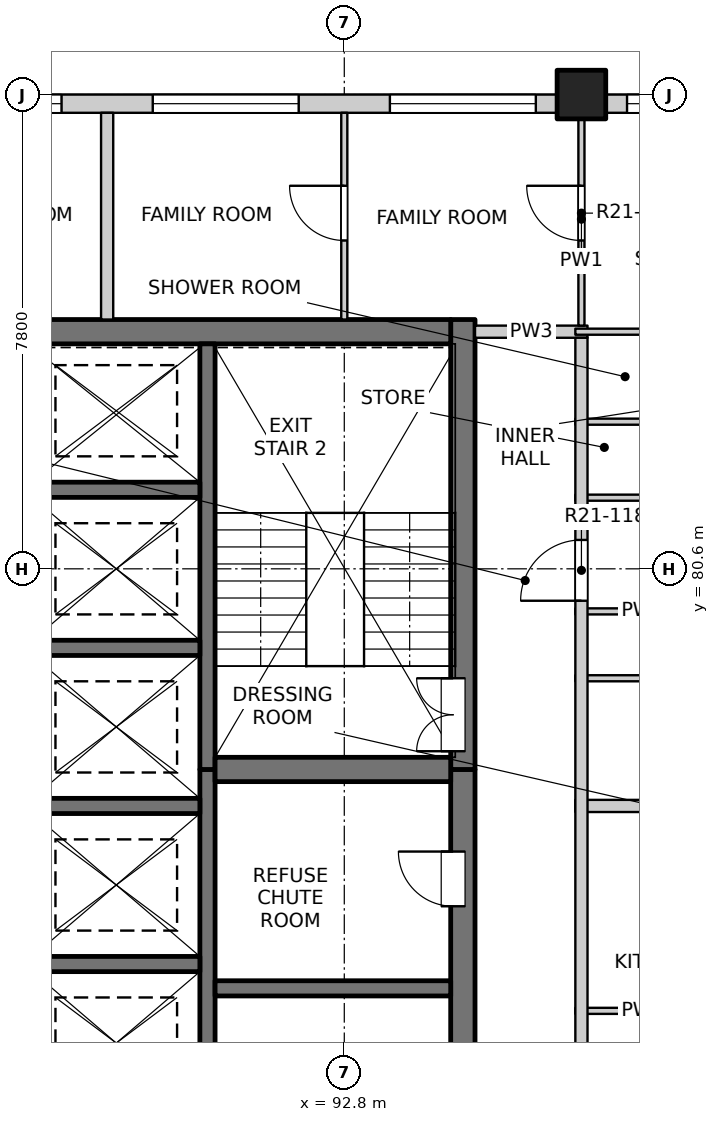
"""IFC4 building model, lengths in metres.
Left out: names, types, materials, properties, quantities, classifications, styles, units other than length and angle.
Written with IfcOpenShell. Run it as: python <this file> out.ifc"""

import sys

from ifc_helpers import new_model, si_unit, direction, frame, frame_2d, origin, origin_2d, place, context, subcontext, project, spatial, rectangle, extrude, element, fill, save


model = new_model("IFC4")
c1 = context("Model", 3, precision=1e-05, world=origin(), true_north=direction((0.0, 1.0)))
c2 = subcontext(c1, "Body", "Model", "MODEL_VIEW")
j1 = project(units=[si_unit("LENGTHUNIT", "METRE"), si_unit("PLANEANGLEUNIT", "RADIAN")], contexts=[c1])
p1 = place(None, origin())
s1 = spatial("IfcSite", under=j1, at=p1, CompositionType="ELEMENT")
p2 = place(p1, origin())
s2 = spatial("IfcBuilding", under=s1, at=p2, CompositionType="ELEMENT")
p3 = place(p2, frame((0.0, 0.0, 221.1)))
s3 = spatial("IfcBuildingStorey", under=s2, at=p3, CompositionType="ELEMENT", Elevation=221.1)
p4 = place(p3, frame((96.7, 88.4, -0.25), z_axis=(0.0, 0.0, 1.0), x_axis=(1.0, 0.0, 0.0)))
e1 = element("IfcColumn", 1, at=p4, inside=s3, PredefinedType="COLUMN", context=c2, shape_type="SweptSolid", body=[
    extrude(rectangle(XDim=0.8, YDim=0.8, at=origin_2d()), origin(), (0.0, 0.0, 1.0), 3.4),
])
p5 = place(p3, frame((94.75, 61.95, -0.25), z_axis=(0.0, 0.0, 1.0), x_axis=(0.0, 1.0, 0.0)))
e2 = element("IfcWall", 2, at=p5, inside=s3, PredefinedType="SOLIDWALL", context=c2, shape_type="SweptSolid", body=[
    extrude(rectangle(XDim=15.35, YDim=0.4, at=frame_2d((7.675, 0.0))), origin(), (0.0, 0.0, 1.0), 3.4),
])
p6 = place(p5, frame((0.925, 0.0, 0.25)))
e3 = element("IfcOpeningElement", 3, at=p6, cuts=e2, PredefinedType="OPENING", context=c2, shape_type="SweptSolid", body=[
    extrude(rectangle(XDim=0.9, YDim=2.1, at=frame_2d((0.45, 1.05))), frame((0.0, 0.21, 0.0), z_axis=(0.0, -1.0, 0.0), x_axis=(1.0, 0.0, 0.0)), (0.0, 0.0, 1.0), 0.42),
])
p7 = place(p5, frame((3.8, 0.0, 0.25)))
e4 = element("IfcOpeningElement", 4, at=p7, cuts=e2, PredefinedType="OPENING", context=c2, shape_type="SweptSolid", body=[
    extrude(rectangle(XDim=0.9, YDim=2.1, at=frame_2d((0.45, 1.05))), frame((0.0, 0.21, 0.0), z_axis=(0.0, -1.0, 0.0), x_axis=(1.0, 0.0, 0.0)), (0.0, 0.0, 1.0), 0.42),
])
p8 = place(p5, frame((8.3, 0.0, 0.25)))
e5 = element("IfcOpeningElement", 5, at=p8, cuts=e2, PredefinedType="OPENING", context=c2, shape_type="SweptSolid", body=[
    extrude(rectangle(XDim=0.9, YDim=2.1, at=frame_2d((0.45, 1.05))), frame((0.0, 0.21, 0.0), z_axis=(0.0, -1.0, 0.0), x_axis=(1.0, 0.0, 0.0)), (0.0, 0.0, 1.0), 0.42),
])
p9 = place(p5, frame((13.1, 0.0, 0.25)))
e6 = element("IfcOpeningElement", 6, at=p9, cuts=e2, PredefinedType="OPENING", context=c2, shape_type="SweptSolid", body=[
    extrude(rectangle(XDim=0.9, YDim=2.1, at=frame_2d((0.45, 1.05))), frame((0.0, 0.21, 0.0), z_axis=(0.0, -1.0, 0.0), x_axis=(1.0, 0.0, 0.0)), (0.0, 0.0, 1.0), 0.42),
])
p10 = place(p3, frame((94.75, 77.3, -0.25), z_axis=(0.0, 0.0, 1.0), x_axis=(0.0, 1.0, 0.0)))
e7 = element("IfcWall", 7, at=p10, inside=s3, PredefinedType="SOLIDWALL", context=c2, shape_type="SweptSolid", body=[
    extrude(rectangle(XDim=7.4, YDim=0.4, at=frame_2d((3.7, 0.0))), origin(), (0.0, 0.0, 1.0), 3.4),
])
p11 = place(p10, frame((0.3, 0.0, 0.25)))
e8 = element("IfcOpeningElement", 8, at=p11, cuts=e7, PredefinedType="OPENING", context=c2, shape_type="SweptSolid", body=[
    extrude(rectangle(XDim=1.2, YDim=2.1, at=frame_2d((0.6, 1.05))), frame((0.0, 0.21, 0.0), z_axis=(0.0, -1.0, 0.0), x_axis=(1.0, 0.0, 0.0)), (0.0, 0.0, 1.0), 0.42),
])
p12 = place(p3, frame((75.45, 84.5, -0.25), z_axis=(0.0, 0.0, 1.0), x_axis=(1.0, 0.0, 0.0)))
e9 = element("IfcWall", 9, at=p12, inside=s3, PredefinedType="SOLIDWALL", context=c2, shape_type="SweptSolid", body=[
    extrude(rectangle(XDim=19.1, YDim=0.4, at=frame_2d((9.55, 0.0))), origin(), (0.0, 0.0, 1.0), 3.4),
])
p13 = place(p3, frame((90.55, 61.95, -0.25), z_axis=(0.0, 0.0, 1.0), x_axis=(0.0, 1.0, 0.0)))
e10 = element("IfcWall", 10, at=p13, inside=s3, PredefinedType="SOLIDWALL", context=c2, shape_type="SweptSolid", body=[
    extrude(rectangle(XDim=15.35, YDim=0.25, at=frame_2d((7.675, 0.0))), origin(), (0.0, 0.0, 1.0), 3.4),
])
p14 = place(p3, frame((90.55, 77.3, -0.25), z_axis=(0.0, 0.0, 1.0), x_axis=(0.0, 1.0, 0.0)))
e11 = element("IfcWall", 11, at=p14, inside=s3, PredefinedType="SOLIDWALL", context=c2, shape_type="SweptSolid", body=[
    extrude(rectangle(XDim=7.0, YDim=0.25, at=frame_2d((3.5, 0.0))), origin(), (0.0, 0.0, 1.0), 3.4),
])
for number, where, z_axis, x_axis in (
    (12, (87.425, 74.1, -0.25), (0.0, 0.0, 1.0), (1.0, 0.0, 0.0)),
    (13, (87.425, 76.7, -0.25), (0.0, 0.0, 1.0), (1.0, 0.0, 0.0)),
    (14, (87.425, 79.3, -0.25), (0.0, 0.0, 1.0), (1.0, 0.0, 0.0)),
    (15, (87.425, 81.9, -0.25), (0.0, 0.0, 1.0), (1.0, 0.0, 0.0)),
):
    element("IfcWall", number, at=place(p3, frame(where, z_axis=z_axis, x_axis=x_axis)), inside=s3, PredefinedType="SOLIDWALL", context=c2, shape_type="SweptSolid", body=[
        extrude(rectangle(XDim=3.0, YDim=0.25, at=frame_2d((1.5, 0.0))), origin(), (0.0, 0.0, 1.0), 3.4),
    ])
p15 = place(p3, frame((90.675, 73.7, -0.25), z_axis=(0.0, 0.0, 1.0), x_axis=(1.0, 0.0, 0.0)))
e16 = element("IfcWall", 16, at=p15, inside=s3, PredefinedType="SOLIDWALL", context=c2, shape_type="SweptSolid", body=[
    extrude(rectangle(XDim=3.875, YDim=0.25, at=frame_2d((1.938, 0.0))), origin(), (0.0, 0.0, 1.0), 3.4),
])
p16 = place(p3, frame((90.675, 77.3, -0.25), z_axis=(0.0, 0.0, 1.0), x_axis=(1.0, 0.0, 0.0)))
e17 = element("IfcWall", 17, at=p16, inside=s3, PredefinedType="SOLIDWALL", context=c2, shape_type="SweptSolid", body=[
    extrude(rectangle(XDim=3.875, YDim=0.4, at=frame_2d((1.938, 0.0))), origin(), (0.0, 0.0, 1.0), 3.4),
])
p17 = place(p3, frame((73.7, 88.25, 0.0), z_axis=(0.0, 0.0, 1.0), x_axis=(1.0, 0.0, 0.0)))
e18 = element("IfcWall", 18, at=p17, inside=s3, PredefinedType="SOLIDWALL", context=c2, shape_type="SweptSolid", body=[
    extrude(rectangle(XDim=22.6, YDim=0.3, at=frame_2d((11.3, 0.0))), origin(), (0.0, 0.0, 1.0), 2.7),
])
p18 = place(p17, frame((0.35, 0.0, 0.9)))
e19 = element("IfcOpeningElement", 19, at=p18, cuts=e18, PredefinedType="OPENING", context=c2, shape_type="SweptSolid", body=[
    extrude(rectangle(XDim=2.4, YDim=1.8, at=frame_2d((1.2, 0.9))), frame((0.0, 0.16, 0.0), z_axis=(0.0, -1.0, 0.0), x_axis=(1.0, 0.0, 0.0)), (0.0, 0.0, 1.0), 0.32),
])
p19 = place(p17, frame((4.25, 0.0, 0.9)))
e20 = element("IfcOpeningElement", 20, at=p19, cuts=e18, PredefinedType="OPENING", context=c2, shape_type="SweptSolid", body=[
    extrude(rectangle(XDim=2.4, YDim=1.8, at=frame_2d((1.2, 0.9))), frame((0.0, 0.16, 0.0), z_axis=(0.0, -1.0, 0.0), x_axis=(1.0, 0.0, 0.0)), (0.0, 0.0, 1.0), 0.32),
])
p20 = place(p17, frame((8.15, 0.0, 0.9)))
e21 = element("IfcOpeningElement", 21, at=p20, cuts=e18, PredefinedType="OPENING", context=c2, shape_type="SweptSolid", body=[
    extrude(rectangle(XDim=2.4, YDim=1.8, at=frame_2d((1.2, 0.9))), frame((0.0, 0.16, 0.0), z_axis=(0.0, -1.0, 0.0), x_axis=(1.0, 0.0, 0.0)), (0.0, 0.0, 1.0), 0.32),
])
p21 = place(p17, frame((12.05, 0.0, 0.9)))
e22 = element("IfcOpeningElement", 22, at=p21, cuts=e18, PredefinedType="OPENING", context=c2, shape_type="SweptSolid", body=[
    extrude(rectangle(XDim=2.4, YDim=1.8, at=frame_2d((1.2, 0.9))), frame((0.0, 0.16, 0.0), z_axis=(0.0, -1.0, 0.0), x_axis=(1.0, 0.0, 0.0)), (0.0, 0.0, 1.0), 0.32),
])
p22 = place(p17, frame((15.95, 0.0, 0.9)))
e23 = element("IfcOpeningElement", 23, at=p22, cuts=e18, PredefinedType="OPENING", context=c2, shape_type="SweptSolid", body=[
    extrude(rectangle(XDim=2.4, YDim=1.8, at=frame_2d((1.2, 0.9))), frame((0.0, 0.16, 0.0), z_axis=(0.0, -1.0, 0.0), x_axis=(1.0, 0.0, 0.0)), (0.0, 0.0, 1.0), 0.32),
])
p23 = place(p17, frame((19.85, 0.0, 0.9)))
e24 = element("IfcOpeningElement", 24, at=p23, cuts=e18, PredefinedType="OPENING", context=c2, shape_type="SweptSolid", body=[
    extrude(rectangle(XDim=2.4, YDim=1.8, at=frame_2d((1.2, 0.9))), frame((0.0, 0.16, 0.0), z_axis=(0.0, -1.0, 0.0), x_axis=(1.0, 0.0, 0.0)), (0.0, 0.0, 1.0), 0.32),
])
p24 = place(p3, frame((97.1, 88.25, 0.0), z_axis=(0.0, 0.0, 1.0), x_axis=(1.0, 0.0, 0.0)))
e25 = element("IfcWall", 25, at=p24, inside=s3, PredefinedType="SOLIDWALL", context=c2, shape_type="SweptSolid", body=[
    extrude(rectangle(XDim=7.4, YDim=0.3, at=frame_2d((3.7, 0.0))), origin(), (0.0, 0.0, 1.0), 2.7),
])
p25 = place(p24, frame((0.35, 0.0, 0.9)))
e26 = element("IfcOpeningElement", 26, at=p25, cuts=e25, PredefinedType="OPENING", context=c2, shape_type="SweptSolid", body=[
    extrude(rectangle(XDim=2.4, YDim=1.8, at=frame_2d((1.2, 0.9))), frame((0.0, 0.16, 0.0), z_axis=(0.0, -1.0, 0.0), x_axis=(1.0, 0.0, 0.0)), (0.0, 0.0, 1.0), 0.32),
])
p26 = place(p24, frame((4.25, 0.0, 0.9)))
e27 = element("IfcOpeningElement", 27, at=p26, cuts=e25, PredefinedType="OPENING", context=c2, shape_type="SweptSolid", body=[
    extrude(rectangle(XDim=2.4, YDim=1.8, at=frame_2d((1.2, 0.9))), frame((0.0, 0.16, 0.0), z_axis=(0.0, -1.0, 0.0), x_axis=(1.0, 0.0, 0.0)), (0.0, 0.0, 1.0), 0.32),
])
p27 = place(p3, frame((96.6, 73.33, 0.0), z_axis=(0.0, 0.0, 1.0), x_axis=(1.0, 0.0, 0.0)))
e28 = element("IfcWall", 28, at=p27, inside=s3, PredefinedType="PARTITIONING", context=c2, shape_type="SweptSolid", body=[
    extrude(rectangle(XDim=2.22, YDim=0.1, at=frame_2d((1.11, 0.0))), origin(), (0.0, 0.0, 1.0), 3.15),
])
p28 = place(p3, frame((96.6, 76.7, 0.0), z_axis=(0.0, 0.0, 1.0), x_axis=(1.0, 0.0, 0.0)))
e29 = element("IfcWall", 29, at=p28, inside=s3, PredefinedType="PARTITIONING", context=c2, shape_type="SweptSolid", body=[
    extrude(rectangle(XDim=11.5, YDim=0.2, at=frame_2d((5.75, 0.0))), origin(), (0.0, 0.0, 1.0), 2.55),
])
for number, where, z_axis, x_axis in (
    (30, (96.6, 78.8, 0.0), (0.0, 0.0, 1.0), (1.0, 0.0, 0.0)),
    (31, (96.6, 79.9, 0.0), (0.0, 0.0, 1.0), (1.0, 0.0, 0.0)),
    (32, (96.6, 81.77, 0.0), (0.0, 0.0, 1.0), (1.0, 0.0, 0.0)),
    (33, (96.6, 83.02, 0.0), (0.0, 0.0, 1.0), (1.0, 0.0, 0.0)),
):
    element("IfcWall", number, at=place(p3, frame(where, z_axis=z_axis, x_axis=x_axis)), inside=s3, PredefinedType="PARTITIONING", context=c2, shape_type="SweptSolid", body=[
        extrude(rectangle(XDim=2.22, YDim=0.1, at=frame_2d((1.11, 0.0))), origin(), (0.0, 0.0, 1.0), 3.15),
    ])
p29 = place(p3, frame((94.95, 84.5, 0.0), z_axis=(0.0, 0.0, 1.0), x_axis=(1.0, 0.0, 0.0)))
e34 = element("IfcWall", 34, at=p29, inside=s3, PredefinedType="PARTITIONING", context=c2, shape_type="SweptSolid", body=[
    extrude(rectangle(XDim=1.85, YDim=0.2, at=frame_2d((0.925, 0.0))), origin(), (0.0, 0.0, 1.0), 3.15),
])
p30 = place(p3, frame((96.6, 84.5, 0.0), z_axis=(0.0, 0.0, 1.0), x_axis=(1.0, 0.0, 0.0)))
e35 = element("IfcWall", 35, at=p30, inside=s3, PredefinedType="PARTITIONING", context=c2, shape_type="SweptSolid", body=[
    extrude(rectangle(XDim=11.5, YDim=0.1, at=frame_2d((5.75, 0.0))), origin(), (0.0, 0.0, 1.0), 3.15),
])
p31 = place(p30, frame((2.635, 0.0, 0.0)))
e36 = element("IfcOpeningElement", 36, at=p31, cuts=e35, PredefinedType="OPENING", context=c2, shape_type="SweptSolid", body=[
    extrude(rectangle(XDim=0.9, YDim=2.1, at=frame_2d((0.45, 1.05))), frame((0.0, 0.06, 0.0), z_axis=(0.0, -1.0, 0.0), x_axis=(1.0, 0.0, 0.0)), (0.0, 0.0, 1.0), 0.12),
])
p32 = place(p3, frame((88.9, 84.7, 0.0), z_axis=(0.0, 0.0, 1.0), x_axis=(0.0, 1.0, 0.0)))
e37 = element("IfcWall", 37, at=p32, inside=s3, PredefinedType="PARTITIONING", context=c2, shape_type="SweptSolid", body=[
    extrude(rectangle(XDim=3.4, YDim=0.2, at=frame_2d((1.7, 0.0))), origin(), (0.0, 0.0, 1.0), 3.15),
])
p33 = place(p3, frame((92.8, 84.7, 0.0), z_axis=(0.0, 0.0, 1.0), x_axis=(0.0, 1.0, 0.0)))
e38 = element("IfcWall", 38, at=p33, inside=s3, PredefinedType="PARTITIONING", context=c2, shape_type="SweptSolid", body=[
    extrude(rectangle(XDim=3.4, YDim=0.1, at=frame_2d((1.7, 0.0))), origin(), (0.0, 0.0, 1.0), 3.15),
])
p34 = place(p33, frame((1.3, 0.0, 0.0)))
e39 = element("IfcOpeningElement", 39, at=p34, cuts=e38, PredefinedType="OPENING", context=c2, shape_type="SweptSolid", body=[
    extrude(rectangle(XDim=0.9, YDim=2.1, at=frame_2d((0.45, 1.05))), frame((0.0, 0.06, 0.0), z_axis=(0.0, -1.0, 0.0), x_axis=(1.0, 0.0, 0.0)), (0.0, 0.0, 1.0), 0.12),
])
p35 = place(p3, frame((96.7, 49.5, 0.0), z_axis=(0.0, 0.0, 1.0), x_axis=(0.0, 1.0, 0.0)))
e40 = element("IfcWall", 40, at=p35, inside=s3, PredefinedType="PARTITIONING", context=c2, shape_type="SweptSolid", body=[
    extrude(rectangle(XDim=34.9, YDim=0.2, at=frame_2d((17.45, 0.0))), origin(), (0.0, 0.0, 1.0), 3.15),
])
p36 = place(p35, frame((3.275, 0.0, 0.0)))
e41 = element("IfcOpeningElement", 41, at=p36, cuts=e40, PredefinedType="OPENING", context=c2, shape_type="SweptSolid", body=[
    extrude(rectangle(XDim=1.0, YDim=2.1, at=frame_2d((0.5, 1.05))), frame((0.0, 0.11, 0.0), z_axis=(0.0, -1.0, 0.0), x_axis=(1.0, 0.0, 0.0)), (0.0, 0.0, 1.0), 0.22),
])
p37 = place(p35, frame((10.825, 0.0, 0.0)))
e42 = element("IfcOpeningElement", 42, at=p37, cuts=e40, PredefinedType="OPENING", context=c2, shape_type="SweptSolid", body=[
    extrude(rectangle(XDim=1.0, YDim=2.1, at=frame_2d((0.5, 1.05))), frame((0.0, 0.11, 0.0), z_axis=(0.0, -1.0, 0.0), x_axis=(1.0, 0.0, 0.0)), (0.0, 0.0, 1.0), 0.22),
])
p38 = place(p35, frame((21.575, 0.0, 0.0)))
e43 = element("IfcOpeningElement", 43, at=p38, cuts=e40, PredefinedType="OPENING", context=c2, shape_type="SweptSolid", body=[
    extrude(rectangle(XDim=1.0, YDim=2.1, at=frame_2d((0.5, 1.05))), frame((0.0, 0.11, 0.0), z_axis=(0.0, -1.0, 0.0), x_axis=(1.0, 0.0, 0.0)), (0.0, 0.0, 1.0), 0.22),
])
p39 = place(p35, frame((30.575, 0.0, 0.0)))
e44 = element("IfcOpeningElement", 44, at=p39, cuts=e40, PredefinedType="OPENING", context=c2, shape_type="SweptSolid", body=[
    extrude(rectangle(XDim=1.0, YDim=2.1, at=frame_2d((0.5, 1.05))), frame((0.0, 0.11, 0.0), z_axis=(0.0, -1.0, 0.0), x_axis=(1.0, 0.0, 0.0)), (0.0, 0.0, 1.0), 0.22),
])
p40 = place(p3, frame((96.7, 84.6, 0.0), z_axis=(0.0, 0.0, 1.0), x_axis=(0.0, 1.0, 0.0)))
e45 = element("IfcWall", 45, at=p40, inside=s3, PredefinedType="PARTITIONING", context=c2, shape_type="SweptSolid", body=[
    extrude(rectangle(XDim=3.5, YDim=0.1, at=frame_2d((1.75, 0.0))), origin(), (0.0, 0.0, 1.0), 3.15),
])
p41 = place(p40, frame((1.4, 0.0, 0.0)))
e46 = element("IfcOpeningElement", 46, at=p41, cuts=e45, PredefinedType="OPENING", context=c2, shape_type="SweptSolid", body=[
    extrude(rectangle(XDim=0.9, YDim=2.1, at=frame_2d((0.45, 1.05))), frame((0.0, 0.06, 0.0), z_axis=(0.0, -1.0, 0.0), x_axis=(1.0, 0.0, 0.0)), (0.0, 0.0, 1.0), 0.12),
])
p42 = place(p21, origin())
e47 = element("IfcWindow", 47, at=p42, inside=s3, PartitioningType="DOUBLE_PANEL_VERTICAL", PredefinedType="WINDOW", context=c2, shape_type="SweptSolid", body=[
    extrude(rectangle(XDim=2.4, YDim=1.8, at=frame_2d((1.2, 0.9))), frame((0.0, 0.03, 0.0), z_axis=(0.0, -1.0, 0.0), x_axis=(1.0, 0.0, 0.0)), (0.0, 0.0, 1.0), 0.06),
])
fill(e22, e47)
p43 = place(p22, origin())
e48 = element("IfcWindow", 48, at=p43, inside=s3, PartitioningType="DOUBLE_PANEL_VERTICAL", PredefinedType="WINDOW", context=c2, shape_type="SweptSolid", body=[
    extrude(rectangle(XDim=2.4, YDim=1.8, at=frame_2d((1.2, 0.9))), frame((0.0, 0.03, 0.0), z_axis=(0.0, -1.0, 0.0), x_axis=(1.0, 0.0, 0.0)), (0.0, 0.0, 1.0), 0.06),
])
fill(e23, e48)
p44 = place(p23, origin())
e49 = element("IfcWindow", 49, at=p44, inside=s3, PartitioningType="DOUBLE_PANEL_VERTICAL", PredefinedType="WINDOW", context=c2, shape_type="SweptSolid", body=[
    extrude(rectangle(XDim=2.4, YDim=1.8, at=frame_2d((1.2, 0.9))), frame((0.0, 0.03, 0.0), z_axis=(0.0, -1.0, 0.0), x_axis=(1.0, 0.0, 0.0)), (0.0, 0.0, 1.0), 0.06),
])
fill(e24, e49)
p45 = place(p25, origin())
e50 = element("IfcWindow", 50, at=p45, inside=s3, PartitioningType="DOUBLE_PANEL_VERTICAL", PredefinedType="WINDOW", context=c2, shape_type="SweptSolid", body=[
    extrude(rectangle(XDim=2.4, YDim=1.8, at=frame_2d((1.2, 0.9))), frame((0.0, 0.03, 0.0), z_axis=(0.0, -1.0, 0.0), x_axis=(1.0, 0.0, 0.0)), (0.0, 0.0, 1.0), 0.06),
])
fill(e26, e50)
p46 = place(p9, origin())
e51 = element("IfcDoor", 51, at=p46, inside=s3, OperationType="SINGLE_SWING_RIGHT", PredefinedType="DOOR", context=c2, shape_type="SweptSolid", body=[
    extrude(rectangle(XDim=0.9, YDim=2.1, at=frame_2d((0.45, 1.05))), frame((0.0, 0.185, 0.0), z_axis=(0.0, -1.0, 0.0), x_axis=(1.0, 0.0, 0.0)), (0.0, 0.0, 1.0), 0.05),
])
fill(e6, e51)
p47 = place(p11, origin())
e52 = element("IfcDoor", 52, at=p47, inside=s3, OperationType="DOUBLE_DOOR_SINGLE_SWING", PredefinedType="DOOR", context=c2, shape_type="SweptSolid", body=[
    extrude(rectangle(XDim=1.2, YDim=2.1, at=frame_2d((0.6, 1.05))), frame((0.0, 0.185, 0.0), z_axis=(0.0, -1.0, 0.0), x_axis=(1.0, 0.0, 0.0)), (0.0, 0.0, 1.0), 0.05),
])
fill(e8, e52)
p48 = place(p39, origin())
e53 = element("IfcDoor", 53, at=p48, inside=s3, OperationType="SINGLE_SWING_LEFT", PredefinedType="DOOR", context=c2, shape_type="SweptSolid", body=[
    extrude(rectangle(XDim=1.0, YDim=2.1, at=frame_2d((0.5, 1.05))), frame((0.0, 0.025, 0.0), z_axis=(0.0, -1.0, 0.0), x_axis=(1.0, 0.0, 0.0)), (0.0, 0.0, 1.0), 0.05),
])
fill(e44, e53)
p49 = place(p34, origin())
e54 = element("IfcDoor", 54, at=p49, inside=s3, OperationType="SINGLE_SWING_RIGHT", PredefinedType="DOOR", context=c2, shape_type="SweptSolid", body=[
    extrude(rectangle(XDim=0.9, YDim=2.1, at=frame_2d((0.45, 1.05))), frame((0.0, 0.025, 0.0), z_axis=(0.0, -1.0, 0.0), x_axis=(1.0, 0.0, 0.0)), (0.0, 0.0, 1.0), 0.05),
])
fill(e39, e54)
p50 = place(p41, origin())
e55 = element("IfcDoor", 55, at=p50, inside=s3, OperationType="SINGLE_SWING_RIGHT", PredefinedType="DOOR", context=c2, shape_type="SweptSolid", body=[
    extrude(rectangle(XDim=0.9, YDim=2.1, at=frame_2d((0.45, 1.05))), frame((0.0, 0.025, 0.0), z_axis=(0.0, -1.0, 0.0), x_axis=(1.0, 0.0, 0.0)), (0.0, 0.0, 1.0), 0.05),
])
fill(e46, e55)
save(model, sys.argv[1])
